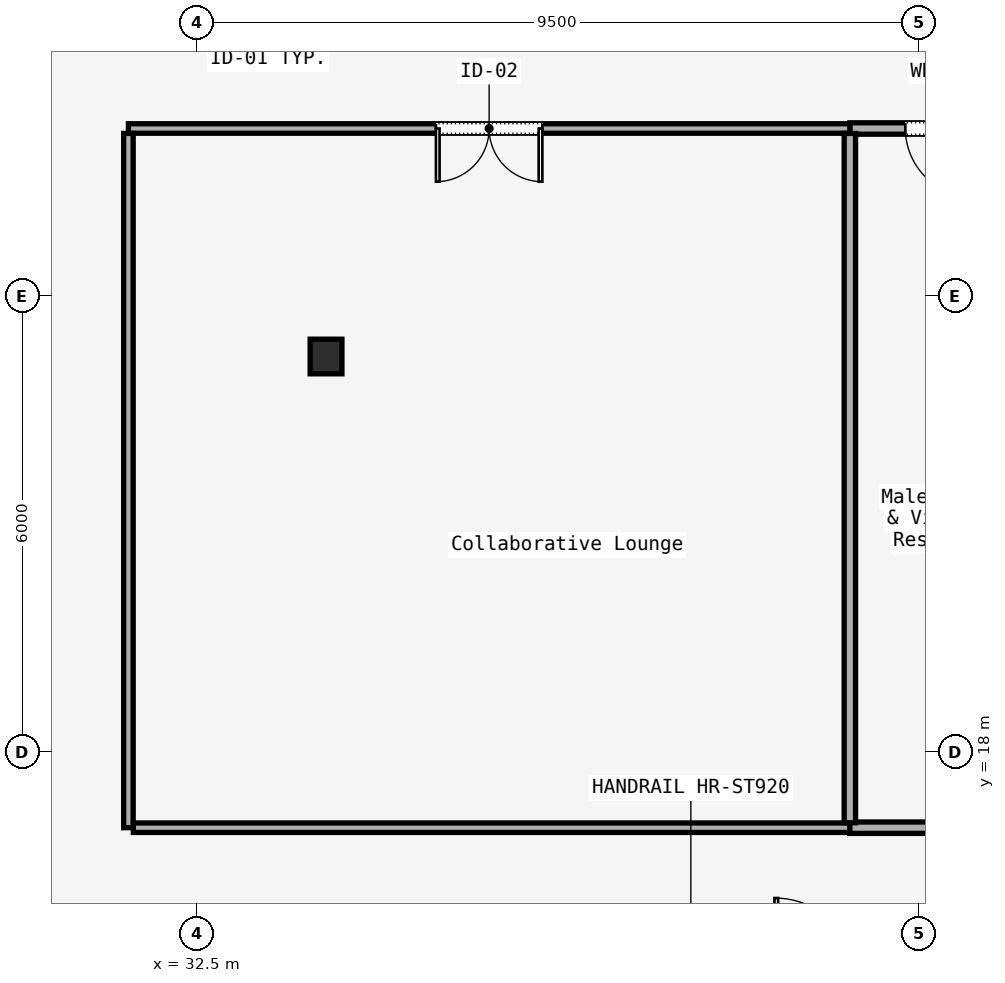
"""IFC4 building model, lengths in metres.
Left out: names, types, materials, properties, quantities, classifications, styles, units other than length and angle.
Written with IfcOpenShell. Run it as: python <this file> out.ifc"""

import sys

from ifc_helpers import new_model, si_unit, direction, frame, frame_2d, origin, origin_2d, place, context, subcontext, project, spatial, rectangle, i_section, extrude, element, fill, save


model = new_model("IFC4")
c1 = context("Model", 3, precision=1e-05, world=origin(), true_north=direction((0.0, 1.0)))
c2 = subcontext(c1, "Body", "Model", "MODEL_VIEW")
j1 = project(units=[si_unit("LENGTHUNIT", "METRE"), si_unit("PLANEANGLEUNIT", "RADIAN")], contexts=[c1])
p1 = place(None, origin())
s1 = spatial("IfcSite", under=j1, at=p1, CompositionType="ELEMENT")
p2 = place(p1, origin())
s2 = spatial("IfcBuilding", under=s1, at=p2, CompositionType="ELEMENT")
p3 = place(p2, frame((0.0, 0.0, 89.2)))
s3 = spatial("IfcBuildingStorey", under=s2, at=p3, CompositionType="ELEMENT", Elevation=89.2)
p4 = place(p3, frame((34.2, 23.2, 0.0), z_axis=(0.0, 0.0, 1.0), x_axis=(1.0, 0.0, 0.0)))
e1 = element("IfcColumn", 1, at=p4, inside=s3, PredefinedType="COLUMN", context=c2, shape_type="SweptSolid", body=[
    extrude(i_section(OverallWidth=0.418, OverallDepth=0.456, WebThickness=0.042, FlangeThickness=0.067, FilletRadius=0.015, at=origin_2d()), origin(), (0.0, 0.0, 1.0), 3.58),
])
p5 = place(p3, frame((43.451, 26.2, 0.0), z_axis=(0.0, 0.0, 1.0), x_axis=(-1.0, 0.0, 0.0)))
e2 = element("IfcWall", 2, at=p5, inside=s3, PredefinedType="PARTITIONING", context=c2, shape_type="SweptSolid", body=[
    extrude(rectangle(XDim=2.359, YDim=0.15, at=frame_2d((1.18, 0.0))), origin(), (0.0, 0.0, 1.0), 2.95),
])
p6 = place(p5, frame((0.73, 0.0, 0.0)))
e3 = element("IfcOpeningElement", 3, at=p6, cuts=e2, PredefinedType="OPENING", context=c2, shape_type="SweptSolid", body=[
    extrude(rectangle(XDim=0.9, YDim=2.15, at=frame_2d((0.45, 1.075))), frame((0.0, 0.075, 0.0), z_axis=(0.0, -1.0, 0.0), x_axis=(1.0, 0.0, 0.0)), (0.0, 0.0, 1.0), 0.15),
])
p7 = place(p3, frame((41.092, 26.2, 0.0), z_axis=(0.0, 0.0, 1.0), x_axis=(-1.0, 0.0, 0.0)))
e4 = element("IfcWall", 4, at=p7, inside=s3, PredefinedType="PARTITIONING", context=c2, shape_type="SweptSolid", body=[
    extrude(rectangle(XDim=9.492, YDim=0.125, at=frame_2d((4.746, 0.0))), origin(), (0.0, 0.0, 1.0), 2.95),
])
p8 = place(p7, frame((4.046, 0.0, 0.0)))
e5 = element("IfcOpeningElement", 5, at=p8, cuts=e4, PredefinedType="OPENING", context=c2, shape_type="SweptSolid", body=[
    extrude(rectangle(XDim=1.4, YDim=2.2, at=frame_2d((0.7, 1.1))), frame((0.0, 0.062, 0.0), z_axis=(0.0, -1.0, 0.0), x_axis=(1.0, 0.0, 0.0)), (0.0, 0.0, 1.0), 0.125),
])
p9 = place(p3, frame((31.6, 26.135, 0.0), z_axis=(0.0, 0.0, 1.0), x_axis=(0.0, -1.0, 0.0)))
e6 = element("IfcWall", 6, at=p9, inside=s3, PredefinedType="PARTITIONING", context=c2, shape_type="SweptSolid", body=[
    extrude(rectangle(XDim=9.135, YDim=0.125, at=frame_2d((4.567, 0.0))), origin(), (0.0, 0.0, 1.0), 2.95),
])
p10 = place(p3, frame((31.665, 17.0, 0.0), z_axis=(0.0, 0.0, 1.0), x_axis=(1.0, 0.0, 0.0)))
e7 = element("IfcWall", 7, at=p10, inside=s3, PredefinedType="PARTITIONING", context=c2, shape_type="SweptSolid", body=[
    extrude(rectangle(XDim=9.427, YDim=0.125, at=frame_2d((4.713, 0.0))), origin(), (0.0, 0.0, 1.0), 2.95),
])
p11 = place(p3, frame((41.092, 17.0, 0.0), z_axis=(0.0, 0.0, 1.0), x_axis=(1.0, 0.0, 0.0)))
e8 = element("IfcWall", 8, at=p11, inside=s3, PredefinedType="PARTITIONING", context=c2, shape_type="SweptSolid", body=[
    extrude(rectangle(XDim=2.359, YDim=0.15, at=frame_2d((1.18, 0.0))), origin(), (0.0, 0.0, 1.0), 2.95),
])
p12 = place(p3, frame((41.092, 26.135, 0.0), z_axis=(0.0, 0.0, 1.0), x_axis=(0.0, -1.0, 0.0)))
e9 = element("IfcWall", 9, at=p12, inside=s3, PredefinedType="PARTITIONING", context=c2, shape_type="SweptSolid", body=[
    extrude(rectangle(XDim=9.07, YDim=0.15, at=frame_2d((4.535, 0.0))), origin(), (0.0, 0.0, 1.0), 2.95),
])
p13 = place(p8, origin())
e10 = element("IfcDoor", 10, at=p13, inside=s3, OperationType="SINGLE_SWING_RIGHT", PredefinedType="DOOR", context=c2, shape_type="SweptSolid", body=[
    extrude(rectangle(XDim=1.4, YDim=2.2, at=frame_2d((0.7, 1.1))), frame((0.0, 0.025, 0.0), z_axis=(0.0, -1.0, 0.0), x_axis=(1.0, 0.0, 0.0)), (0.0, 0.0, 1.0), 0.05),
])
fill(e5, e10)
p14 = place(p6, origin())
e11 = element("IfcDoor", 11, at=p14, inside=s3, OperationType="SINGLE_SWING_LEFT", PredefinedType="DOOR", context=c2, shape_type="SweptSolid", body=[
    extrude(rectangle(XDim=0.9, YDim=2.15, at=frame_2d((0.45, 1.075))), frame((0.0, 0.025, 0.0), z_axis=(0.0, -1.0, 0.0), x_axis=(1.0, 0.0, 0.0)), (0.0, 0.0, 1.0), 0.05),
])
fill(e3, e11)
save(model, sys.argv[1])
